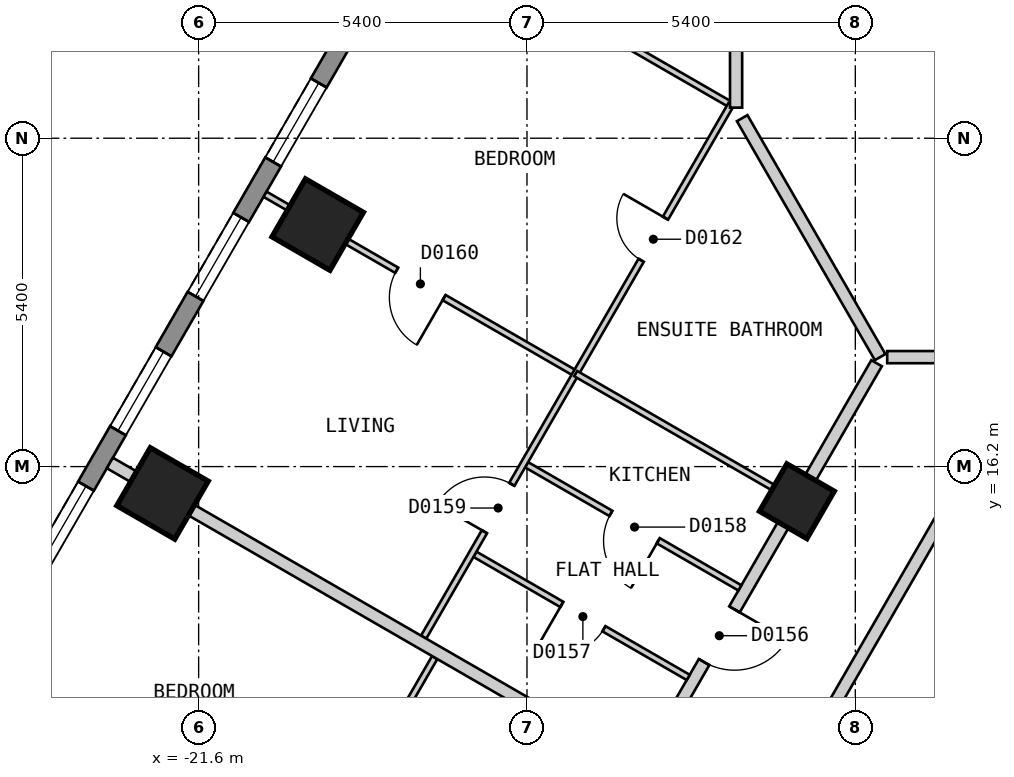
"""IFC4 building model, lengths in metres.
Left out: names, types, materials, properties, quantities, classifications, styles, units other than length and angle.
Written with IfcOpenShell. Run it as: python <this file> out.ifc"""

import sys

from ifc_helpers import new_model, si_unit, direction, frame, frame_2d, origin, origin_2d, place, context, subcontext, project, spatial, polyline, rectangle, outline, extrude, element, fill, save


model = new_model("IFC4")
c1 = context("Model", 3, precision=1e-05, world=origin(), true_north=direction((0.0, 1.0)))
c2 = subcontext(c1, "Body", "Model", "MODEL_VIEW")
j1 = project(units=[si_unit("LENGTHUNIT", "METRE"), si_unit("PLANEANGLEUNIT", "RADIAN")], contexts=[c1])
p1 = place(None, origin())
s1 = spatial("IfcSite", under=j1, at=p1, CompositionType="ELEMENT")
p2 = place(p1, origin())
s2 = spatial("IfcBuilding", under=s1, at=p2, CompositionType="ELEMENT")
p3 = place(p2, frame((0.0, 0.0, 29.4)))
s3 = spatial("IfcBuildingStorey", under=s2, at=p3, CompositionType="ELEMENT", Elevation=29.4)
for number, where, z_axis, x_axis in (
    (1, (-19.642, 20.18, 0.0), (0.0, 0.0, 1.0), (-0.5, -0.866, 0.0)),
    (2, (-22.194, 15.759, 0.0), (0.0, 0.0, 1.0), (-0.5, -0.866, 0.0)),
):
    element("IfcColumn", number, at=place(p3, frame(where, z_axis=z_axis, x_axis=x_axis)), inside=s3, PredefinedType="COLUMN", context=c2, shape_type="SweptSolid", body=[
        extrude(rectangle(XDim=1.1, YDim=1.1, at=origin_2d()), origin(), (0.0, 0.0, 1.0), 3.0),
    ])
p4 = place(p3, frame((-11.761, 15.63, 0.0), z_axis=(0.0, 0.0, 1.0), x_axis=(-0.499984884929, -0.866034130299, 0.0)))
e3 = element("IfcColumn", 3, at=p4, inside=s3, PredefinedType="COLUMN", context=c2, shape_type="SweptSolid", body=[
    extrude(rectangle(XDim=0.9, YDim=0.9, at=origin_2d()), origin(), (0.0, 0.0, 1.0), 3.0),
])
p5 = place(p3, frame((-17.71, 25.825, 0.0), z_axis=(0.0, 0.0, 1.0), x_axis=(-0.500001938803, -0.866024284413, 0.0)))
e4 = element("IfcWall", 4, at=p5, inside=s3, PredefinedType="SOLIDWALL", context=c2, shape_type="SweptSolid", body=[
    extrude(outline(polyline([(0.0, -0.15), (27.02, -0.15), (26.94, 0.15), (0.08, 0.15), (0.0, -0.15)])), origin(), (0.0, 0.0, 1.0), 2.7),
])
p6 = place(p5, frame((1.277, 0.0, 0.15)))
e5 = element("IfcOpeningElement", 5, at=p6, cuts=e4, PredefinedType="OPENING", context=c2, shape_type="SweptSolid", body=[
    extrude(rectangle(XDim=1.5, YDim=2.1, at=frame_2d((0.75, 1.05))), frame((0.0, 0.16, 0.0), z_axis=(0.0, -1.0, 0.0), x_axis=(1.0, 0.0, 0.0)), (0.0, 0.0, 1.0), 0.32),
])
p7 = place(p5, frame((3.829, 0.0, 0.15)))
e6 = element("IfcOpeningElement", 6, at=p7, cuts=e4, PredefinedType="OPENING", context=c2, shape_type="SweptSolid", body=[
    extrude(rectangle(XDim=1.5, YDim=2.1, at=frame_2d((0.75, 1.05))), frame((0.0, 0.16, 0.0), z_axis=(0.0, -1.0, 0.0), x_axis=(1.0, 0.0, 0.0)), (0.0, 0.0, 1.0), 0.32),
])
p8 = place(p5, frame((6.382, 0.0, 0.15)))
e7 = element("IfcOpeningElement", 7, at=p8, cuts=e4, PredefinedType="OPENING", context=c2, shape_type="SweptSolid", body=[
    extrude(rectangle(XDim=1.5, YDim=2.1, at=frame_2d((0.75, 1.05))), frame((0.0, 0.16, 0.0), z_axis=(0.0, -1.0, 0.0), x_axis=(1.0, 0.0, 0.0)), (0.0, 0.0, 1.0), 0.32),
])
p9 = place(p5, frame((8.933, 0.0, 0.15)))
e8 = element("IfcOpeningElement", 8, at=p9, cuts=e4, PredefinedType="OPENING", context=c2, shape_type="SweptSolid", body=[
    extrude(rectangle(XDim=1.5, YDim=2.1, at=frame_2d((0.75, 1.05))), frame((0.0, 0.16, 0.0), z_axis=(0.0, -1.0, 0.0), x_axis=(1.0, 0.0, 0.0)), (0.0, 0.0, 1.0), 0.32),
])
p10 = place(p5, frame((11.485, 0.0, 0.15)))
e9 = element("IfcOpeningElement", 9, at=p10, cuts=e4, PredefinedType="OPENING", context=c2, shape_type="SweptSolid", body=[
    extrude(rectangle(XDim=1.5, YDim=2.1, at=frame_2d((0.75, 1.05))), frame((0.0, 0.16, 0.0), z_axis=(0.0, -1.0, 0.0), x_axis=(1.0, 0.0, 0.0)), (0.0, 0.0, 1.0), 0.32),
])
p11 = place(p5, frame((14.037, 0.0, 0.15)))
e10 = element("IfcOpeningElement", 10, at=p11, cuts=e4, PredefinedType="OPENING", context=c2, shape_type="SweptSolid", body=[
    extrude(rectangle(XDim=1.5, YDim=2.1, at=frame_2d((0.75, 1.05))), frame((0.0, 0.16, 0.0), z_axis=(0.0, -1.0, 0.0), x_axis=(1.0, 0.0, 0.0)), (0.0, 0.0, 1.0), 0.32),
])
p12 = place(p5, frame((16.589, 0.0, 0.15)))
e11 = element("IfcOpeningElement", 11, at=p12, cuts=e4, PredefinedType="OPENING", context=c2, shape_type="SweptSolid", body=[
    extrude(rectangle(XDim=1.5, YDim=2.1, at=frame_2d((0.75, 1.05))), frame((0.0, 0.16, 0.0), z_axis=(0.0, -1.0, 0.0), x_axis=(1.0, 0.0, 0.0)), (0.0, 0.0, 1.0), 0.32),
])
p13 = place(p5, frame((19.141, 0.0, 0.15)))
e12 = element("IfcOpeningElement", 12, at=p13, cuts=e4, PredefinedType="OPENING", context=c2, shape_type="SweptSolid", body=[
    extrude(rectangle(XDim=1.5, YDim=2.1, at=frame_2d((0.75, 1.05))), frame((0.0, 0.16, 0.0), z_axis=(0.0, -1.0, 0.0), x_axis=(1.0, 0.0, 0.0)), (0.0, 0.0, 1.0), 0.32),
])
p14 = place(p5, frame((21.693, 0.0, 0.15)))
e13 = element("IfcOpeningElement", 13, at=p14, cuts=e4, PredefinedType="OPENING", context=c2, shape_type="SweptSolid", body=[
    extrude(rectangle(XDim=1.5, YDim=2.1, at=frame_2d((0.75, 1.05))), frame((0.0, 0.16, 0.0), z_axis=(0.0, -1.0, 0.0), x_axis=(1.0, 0.0, 0.0)), (0.0, 0.0, 1.0), 0.32),
])
p15 = place(p5, frame((24.244, 0.0, 0.15)))
e14 = element("IfcOpeningElement", 14, at=p15, cuts=e4, PredefinedType="OPENING", context=c2, shape_type="SweptSolid", body=[
    extrude(rectangle(XDim=1.5, YDim=2.1, at=frame_2d((0.75, 1.05))), frame((0.0, 0.16, 0.0), z_axis=(0.0, -1.0, 0.0), x_axis=(1.0, 0.0, 0.0)), (0.0, 0.0, 1.0), 0.32),
])
p16 = place(p3, frame((-10.276, 18.0, 0.0), z_axis=(0.0, 0.0, 1.0), x_axis=(1.0, 0.0, 0.0)))
e15 = element("IfcWall", 15, at=p16, inside=s3, PredefinedType="PARTITIONING", context=c2, shape_type="SweptSolid", body=[
    extrude(rectangle(XDim=20.61, YDim=0.2, at=frame_2d((10.305, 0.0))), origin(), (0.0, 0.0, 1.0), 2.7),
])
p17 = place(p16, frame((14.879, 0.0, 0.0)))
e16 = element("IfcOpeningElement", 16, at=p17, cuts=e15, PredefinedType="OPENING", context=c2, shape_type="SweptSolid", body=[
    extrude(rectangle(XDim=1.0, YDim=2.1, at=frame_2d((0.5, 1.05))), frame((0.0, 0.11, 0.0), z_axis=(0.0, -1.0, 0.0), x_axis=(1.0, 0.0, 0.0)), (0.0, 0.0, 1.0), 0.22),
])
p18 = place(p16, frame((9.775, 0.0, 0.0)))
e17 = element("IfcOpeningElement", 17, at=p18, cuts=e15, PredefinedType="OPENING", context=c2, shape_type="SweptSolid", body=[
    extrude(rectangle(XDim=1.0, YDim=2.1, at=frame_2d((0.5, 1.05))), frame((0.0, 0.11, 0.0), z_axis=(0.0, -1.0, 0.0), x_axis=(1.0, 0.0, 0.0)), (0.0, 0.0, 1.0), 0.22),
])
p19 = place(p16, frame((4.671, 0.0, 0.0)))
e18 = element("IfcOpeningElement", 18, at=p19, cuts=e15, PredefinedType="OPENING", context=c2, shape_type="SweptSolid", body=[
    extrude(rectangle(XDim=1.0, YDim=2.1, at=frame_2d((0.5, 1.05))), frame((0.0, 0.11, 0.0), z_axis=(0.0, -1.0, 0.0), x_axis=(1.0, 0.0, 0.0)), (0.0, 0.0, 1.0), 0.22),
])
p20 = place(p16, frame((0.837, 0.0, 0.0)))
e19 = element("IfcOpeningElement", 19, at=p20, cuts=e15, PredefinedType="OPENING", context=c2, shape_type="SweptSolid", body=[
    extrude(rectangle(XDim=0.8, YDim=2.1, at=frame_2d((0.4, 1.05))), frame((0.0, 0.11, 0.0), z_axis=(0.0, -1.0, 0.0), x_axis=(1.0, 0.0, 0.0)), (0.0, 0.0, 1.0), 0.22),
])
p21 = place(p3, frame((-10.854, 8.0, 0.0), z_axis=(0.0, 0.0, 1.0), x_axis=(0.499964141897, 0.86604610548, 0.0)))
e20 = element("IfcWall", 20, at=p21, inside=s3, PredefinedType="PARTITIONING", context=c2, shape_type="SweptSolid", body=[
    extrude(rectangle(XDim=9.007, YDim=0.2, at=frame_2d((4.503, 0.0))), origin(), (0.0, 0.0, 1.0), 2.7),
])
p22 = place(p3, frame((-18.244, -0.001, 0.0), z_axis=(0.0, 0.0, 1.0), x_axis=(0.499962999376, 0.866046765051, 0.0)))
e21 = element("IfcWall", 21, at=p22, inside=s3, PredefinedType="PARTITIONING", context=c2, shape_type="SweptSolid", body=[
    extrude(rectangle(XDim=18.245, YDim=0.2, at=frame_2d((9.123, 0.0))), origin(), (0.0, 0.0, 1.0), 2.7),
])
p23 = place(p22, frame((8.672, 0.0, 0.0)))
e22 = element("IfcOpeningElement", 22, at=p23, cuts=e21, PredefinedType="OPENING", context=c2, shape_type="SweptSolid", body=[
    extrude(rectangle(XDim=0.9, YDim=2.1, at=frame_2d((0.45, 1.05))), frame((0.0, 0.11, 0.0), z_axis=(0.0, -1.0, 0.0), x_axis=(1.0, 0.0, 0.0)), (0.0, 0.0, 1.0), 0.22),
])
p24 = place(p3, frame((-20.727, 0.099, 0.0), z_axis=(0.0, 0.0, 1.0), x_axis=(0.499993204491, 0.866029327138, 0.0)))
e23 = element("IfcWall", 23, at=p24, inside=s3, PredefinedType="PARTITIONING", context=c2, shape_type="SweptSolid", body=[
    extrude(rectangle(XDim=20.554, YDim=0.2, at=frame_2d((10.277, 0.0))), origin(), (0.0, 0.0, 1.0), 2.7),
])
p25 = place(p24, frame((14.88, 0.0, 0.0)))
e24 = element("IfcOpeningElement", 24, at=p25, cuts=e23, PredefinedType="OPENING", context=c2, shape_type="SweptSolid", body=[
    extrude(rectangle(XDim=1.0, YDim=2.1, at=frame_2d((0.5, 1.05))), frame((0.0, 0.11, 0.0), z_axis=(0.0, -1.0, 0.0), x_axis=(1.0, 0.0, 0.0)), (0.0, 0.0, 1.0), 0.22),
])
p26 = place(p24, frame((4.673, 0.0, 0.0)))
e25 = element("IfcOpeningElement", 25, at=p26, cuts=e23, PredefinedType="OPENING", context=c2, shape_type="SweptSolid", body=[
    extrude(rectangle(XDim=1.0, YDim=2.1, at=frame_2d((0.5, 1.05))), frame((0.0, 0.11, 0.0), z_axis=(0.0, -1.0, 0.0), x_axis=(1.0, 0.0, 0.0)), (0.0, 0.0, 1.0), 0.22),
])
p27 = place(p3, frame((-17.056, 14.758, 0.0), z_axis=(0.0, 0.0, 1.0), x_axis=(0.866035025835, -0.499983333749, 0.0)))
e26 = element("IfcWall", 26, at=p27, inside=s3, PredefinedType="PARTITIONING", context=c2, shape_type="SweptSolid", body=[
    extrude(rectangle(XDim=4.051, YDim=0.1, at=frame_2d((2.025, 0.0))), origin(), (0.0, 0.0, 1.0), 2.7),
])
p28 = place(p27, frame((1.65, 0.0, 0.0)))
e27 = element("IfcOpeningElement", 27, at=p28, cuts=e26, PredefinedType="OPENING", context=c2, shape_type="SweptSolid", body=[
    extrude(rectangle(XDim=0.8, YDim=2.1, at=frame_2d((0.4, 1.05))), frame((0.0, 0.06, 0.0), z_axis=(0.0, -1.0, 0.0), x_axis=(1.0, 0.0, 0.0)), (0.0, 0.0, 1.0), 0.12),
])
p29 = place(p3, frame((-16.206, 16.23, 0.0), z_axis=(0.0, 0.0, 1.0), x_axis=(0.866076189179, -0.499912026797, 0.0)))
e28 = element("IfcWall", 28, at=p29, inside=s3, PredefinedType="PARTITIONING", context=c2, shape_type="SweptSolid", body=[
    extrude(rectangle(XDim=4.051, YDim=0.1, at=frame_2d((2.025, 0.0))), origin(), (0.0, 0.0, 1.0), 2.7),
])
p30 = place(p29, frame((1.6, 0.0, 0.0)))
e29 = element("IfcOpeningElement", 29, at=p30, cuts=e28, PredefinedType="OPENING", context=c2, shape_type="SweptSolid", body=[
    extrude(rectangle(XDim=0.9, YDim=2.1, at=frame_2d((0.45, 1.05))), frame((0.0, 0.06, 0.0), z_axis=(0.0, -1.0, 0.0), x_axis=(1.0, 0.0, 0.0)), (0.0, 0.0, 1.0), 0.12),
])
p31 = place(p3, frame((-20.508, 20.679, 0.0), z_axis=(0.0, 0.0, 1.0), x_axis=(0.866052608538, -0.499952877023, 0.0)))
e30 = element("IfcWall", 30, at=p31, inside=s3, PredefinedType="PARTITIONING", context=c2, shape_type="SweptSolid", body=[
    extrude(rectangle(XDim=5.9, YDim=0.1, at=frame_2d((2.95, 0.0))), origin(), (0.0, 0.0, 1.0), 2.7),
])
p32 = place(p31, frame((2.5, 0.0, 0.0)))
e31 = element("IfcOpeningElement", 31, at=p32, cuts=e30, PredefinedType="OPENING", context=c2, shape_type="SweptSolid", body=[
    extrude(rectangle(XDim=0.9, YDim=2.1, at=frame_2d((0.45, 1.05))), frame((0.0, 0.06, 0.0), z_axis=(0.0, -1.0, 0.0), x_axis=(1.0, 0.0, 0.0)), (0.0, 0.0, 1.0), 0.12),
])
p33 = place(p3, frame((-17.955, 25.099, 0.0), z_axis=(0.0, 0.0, 1.0), x_axis=(0.866069217599, -0.499924104568, 0.0)))
e32 = element("IfcWall", 32, at=p33, inside=s3, PredefinedType="PARTITIONING", context=c2, shape_type="SweptSolid", body=[
    extrude(rectangle(XDim=5.869, YDim=0.1, at=frame_2d((2.935, 0.0))), origin(), (0.0, 0.0, 1.0), 2.7),
])
p34 = place(p33, frame((2.51, 0.0, 0.0)))
e33 = element("IfcOpeningElement", 33, at=p34, cuts=e32, PredefinedType="OPENING", context=c2, shape_type="SweptSolid", body=[
    extrude(rectangle(XDim=0.9, YDim=2.1, at=frame_2d((0.45, 1.05))), frame((0.0, 0.06, 0.0), z_axis=(0.0, -1.0, 0.0), x_axis=(1.0, 0.0, 0.0)), (0.0, 0.0, 1.0), 0.12),
])
p35 = place(p3, frame((-25.2, 0.099, 0.0), z_axis=(0.0, 0.0, 1.0), x_axis=(0.49997477318, 0.866039968006, 0.0)))
e34 = element("IfcWall", 34, at=p35, inside=s3, PredefinedType="PARTITIONING", context=c2, shape_type="SweptSolid", body=[
    extrude(rectangle(XDim=14.965, YDim=0.1, at=frame_2d((7.482, 0.0))), origin(), (0.0, 0.0, 1.0), 2.7),
])
p36 = place(p35, frame((6.96, 0.0, 0.0)))
e35 = element("IfcOpeningElement", 35, at=p36, cuts=e34, PredefinedType="OPENING", context=c2, shape_type="SweptSolid", body=[
    extrude(rectangle(XDim=0.9, YDim=2.1, at=frame_2d((0.45, 1.05))), frame((0.0, 0.06, 0.0), z_axis=(0.0, -1.0, 0.0), x_axis=(1.0, 0.0, 0.0)), (0.0, 0.0, 1.0), 0.12),
])
p37 = place(p3, frame((-17.9, 13.395, 0.0), z_axis=(0.0, 0.0, 1.0), x_axis=(0.499949632511, 0.866054481515, 0.0)))
e36 = element("IfcWall", 36, at=p37, inside=s3, PredefinedType="PARTITIONING", context=c2, shape_type="SweptSolid", body=[
    extrude(rectangle(XDim=10.109, YDim=0.1, at=frame_2d((5.054, 0.0))), origin(), (0.0, 0.0, 1.0), 2.7),
])
p38 = place(p37, frame((2.002, 0.0, 0.0)))
e37 = element("IfcOpeningElement", 37, at=p38, cuts=e36, PredefinedType="OPENING", context=c2, shape_type="SweptSolid", body=[
    extrude(rectangle(XDim=0.9, YDim=2.1, at=frame_2d((0.45, 1.05))), frame((0.0, 0.06, 0.0), z_axis=(0.0, -1.0, 0.0), x_axis=(1.0, 0.0, 0.0)), (0.0, 0.0, 1.0), 0.12),
])
p39 = place(p37, frame((7.156, 0.0, 0.0)))
e38 = element("IfcOpeningElement", 38, at=p39, cuts=e36, PredefinedType="OPENING", context=c2, shape_type="SweptSolid", body=[
    extrude(rectangle(XDim=0.8, YDim=2.1, at=frame_2d((0.4, 1.05))), frame((0.0, 0.06, 0.0), z_axis=(0.0, -1.0, 0.0), x_axis=(1.0, 0.0, 0.0)), (0.0, 0.0, 1.0), 0.12),
])
p40 = place(p3, frame((-12.661, 21.93, 0.0), z_axis=(0.0, 0.0, 1.0), x_axis=(0.499975495332, -0.866039551099, 0.0)))
e39 = element("IfcWall", 39, at=p40, inside=s3, PredefinedType="PARTITIONING", context=c2, shape_type="SweptSolid", body=[
    extrude(rectangle(XDim=4.538, YDim=0.2, at=frame_2d((2.269, 0.0))), origin(), (0.0, 0.0, 1.0), 2.7),
])
p41 = place(p3, frame((-23.06, 16.259, 0.0), z_axis=(0.0, 0.0, 1.0), x_axis=(0.866047370643, -0.499961950354, 0.0)))
e40 = element("IfcWall", 40, at=p41, inside=s3, PredefinedType="PARTITIONING", context=c2, shape_type="SweptSolid", body=[
    extrude(rectangle(XDim=10.001, YDim=0.2, at=frame_2d((5.0, 0.0))), origin(), (0.0, 0.0, 1.0), 2.7),
])
p42 = place(p3, frame((-12.761, 22.103, 0.0), z_axis=(0.0, 0.0, 1.0), x_axis=(0.0, 1.0, 0.0)))
e41 = element("IfcWall", 41, at=p42, inside=s3, PredefinedType="PARTITIONING", context=c2, shape_type="SweptSolid", body=[
    extrude(rectangle(XDim=5.997, YDim=0.2, at=frame_2d((2.999, 0.0))), origin(), (0.0, 0.0, 1.0), 2.7),
])
p43 = place(p3, frame((-15.398, 17.729, 0.0), z_axis=(0.0, 0.0, 1.0), x_axis=(0.866039832988, -0.499975007054, 0.0)))
e42 = element("IfcWall", 42, at=p43, inside=s3, PredefinedType="PARTITIONING", context=c2, shape_type="SweptSolid", body=[
    extrude(rectangle(XDim=4.1, YDim=0.1, at=frame_2d((2.05, 0.0))), origin(), (0.0, 0.0, 1.0), 2.7),
])
p44 = place(p7, origin())
e43 = element("IfcWindow", 43, at=p44, inside=s3, PartitioningType="SINGLE_PANEL", PredefinedType="WINDOW", context=c2, shape_type="SweptSolid", body=[
    extrude(rectangle(XDim=1.5, YDim=2.1, at=frame_2d((0.75, 1.05))), frame((0.0, 0.03, 0.0), z_axis=(0.0, -1.0, 0.0), x_axis=(1.0, 0.0, 0.0)), (0.0, 0.0, 1.0), 0.06),
])
fill(e6, e43)
p45 = place(p8, origin())
e44 = element("IfcWindow", 44, at=p45, inside=s3, PartitioningType="SINGLE_PANEL", PredefinedType="WINDOW", context=c2, shape_type="SweptSolid", body=[
    extrude(rectangle(XDim=1.5, YDim=2.1, at=frame_2d((0.75, 1.05))), frame((0.0, 0.03, 0.0), z_axis=(0.0, -1.0, 0.0), x_axis=(1.0, 0.0, 0.0)), (0.0, 0.0, 1.0), 0.06),
])
fill(e7, e44)
p46 = place(p9, origin())
e45 = element("IfcWindow", 45, at=p46, inside=s3, PartitioningType="SINGLE_PANEL", PredefinedType="WINDOW", context=c2, shape_type="SweptSolid", body=[
    extrude(rectangle(XDim=1.5, YDim=2.1, at=frame_2d((0.75, 1.05))), frame((0.0, 0.03, 0.0), z_axis=(0.0, -1.0, 0.0), x_axis=(1.0, 0.0, 0.0)), (0.0, 0.0, 1.0), 0.06),
])
fill(e8, e45)
p47 = place(p10, origin())
e46 = element("IfcWindow", 46, at=p47, inside=s3, PartitioningType="SINGLE_PANEL", PredefinedType="WINDOW", context=c2, shape_type="SweptSolid", body=[
    extrude(rectangle(XDim=1.5, YDim=2.1, at=frame_2d((0.75, 1.05))), frame((0.0, 0.03, 0.0), z_axis=(0.0, -1.0, 0.0), x_axis=(1.0, 0.0, 0.0)), (0.0, 0.0, 1.0), 0.06),
])
fill(e9, e46)
p48 = place(p25, origin())
e47 = element("IfcDoor", 47, at=p48, inside=s3, OperationType="SINGLE_SWING_RIGHT", PredefinedType="DOOR", context=c2, shape_type="SweptSolid", body=[
    extrude(rectangle(XDim=1.0, YDim=2.1, at=frame_2d((0.5, 1.05))), frame((0.0, 0.025, 0.0), z_axis=(0.0, -1.0, 0.0), x_axis=(1.0, 0.0, 0.0)), (0.0, 0.0, 1.0), 0.05),
])
fill(e24, e47)
p49 = place(p28, origin())
e48 = element("IfcDoor", 48, at=p49, inside=s3, OperationType="SINGLE_SWING_LEFT", PredefinedType="DOOR", context=c2, shape_type="SweptSolid", body=[
    extrude(rectangle(XDim=0.8, YDim=2.1, at=frame_2d((0.4, 1.05))), frame((0.0, 0.025, 0.0), z_axis=(0.0, -1.0, 0.0), x_axis=(1.0, 0.0, 0.0)), (0.0, 0.0, 1.0), 0.05),
])
fill(e27, e48)
p50 = place(p30, origin())
e49 = element("IfcDoor", 49, at=p50, inside=s3, OperationType="SINGLE_SWING_RIGHT", PredefinedType="DOOR", context=c2, shape_type="SweptSolid", body=[
    extrude(rectangle(XDim=0.9, YDim=2.1, at=frame_2d((0.45, 1.05))), frame((0.0, 0.025, 0.0), z_axis=(0.0, -1.0, 0.0), x_axis=(1.0, 0.0, 0.0)), (0.0, 0.0, 1.0), 0.05),
])
fill(e29, e49)
p51 = place(p38, origin())
e50 = element("IfcDoor", 50, at=p51, inside=s3, OperationType="SINGLE_SWING_LEFT", PredefinedType="DOOR", context=c2, shape_type="SweptSolid", body=[
    extrude(rectangle(XDim=0.9, YDim=2.1, at=frame_2d((0.45, 1.05))), frame((0.0, 0.025, 0.0), z_axis=(0.0, -1.0, 0.0), x_axis=(1.0, 0.0, 0.0)), (0.0, 0.0, 1.0), 0.05),
])
fill(e37, e50)
p52 = place(p32, origin())
e51 = element("IfcDoor", 51, at=p52, inside=s3, OperationType="SINGLE_SWING_RIGHT", PredefinedType="DOOR", context=c2, shape_type="SweptSolid", body=[
    extrude(rectangle(XDim=0.9, YDim=2.1, at=frame_2d((0.45, 1.05))), frame((0.0, 0.025, 0.0), z_axis=(0.0, -1.0, 0.0), x_axis=(1.0, 0.0, 0.0)), (0.0, 0.0, 1.0), 0.05),
])
fill(e31, e51)
p53 = place(p39, origin())
e52 = element("IfcDoor", 52, at=p53, inside=s3, OperationType="SINGLE_SWING_RIGHT", PredefinedType="DOOR", context=c2, shape_type="SweptSolid", body=[
    extrude(rectangle(XDim=0.8, YDim=2.1, at=frame_2d((0.4, 1.05))), frame((0.0, 0.025, 0.0), z_axis=(0.0, -1.0, 0.0), x_axis=(1.0, 0.0, 0.0)), (0.0, 0.0, 1.0), 0.05),
])
fill(e38, e52)
save(model, sys.argv[1])
